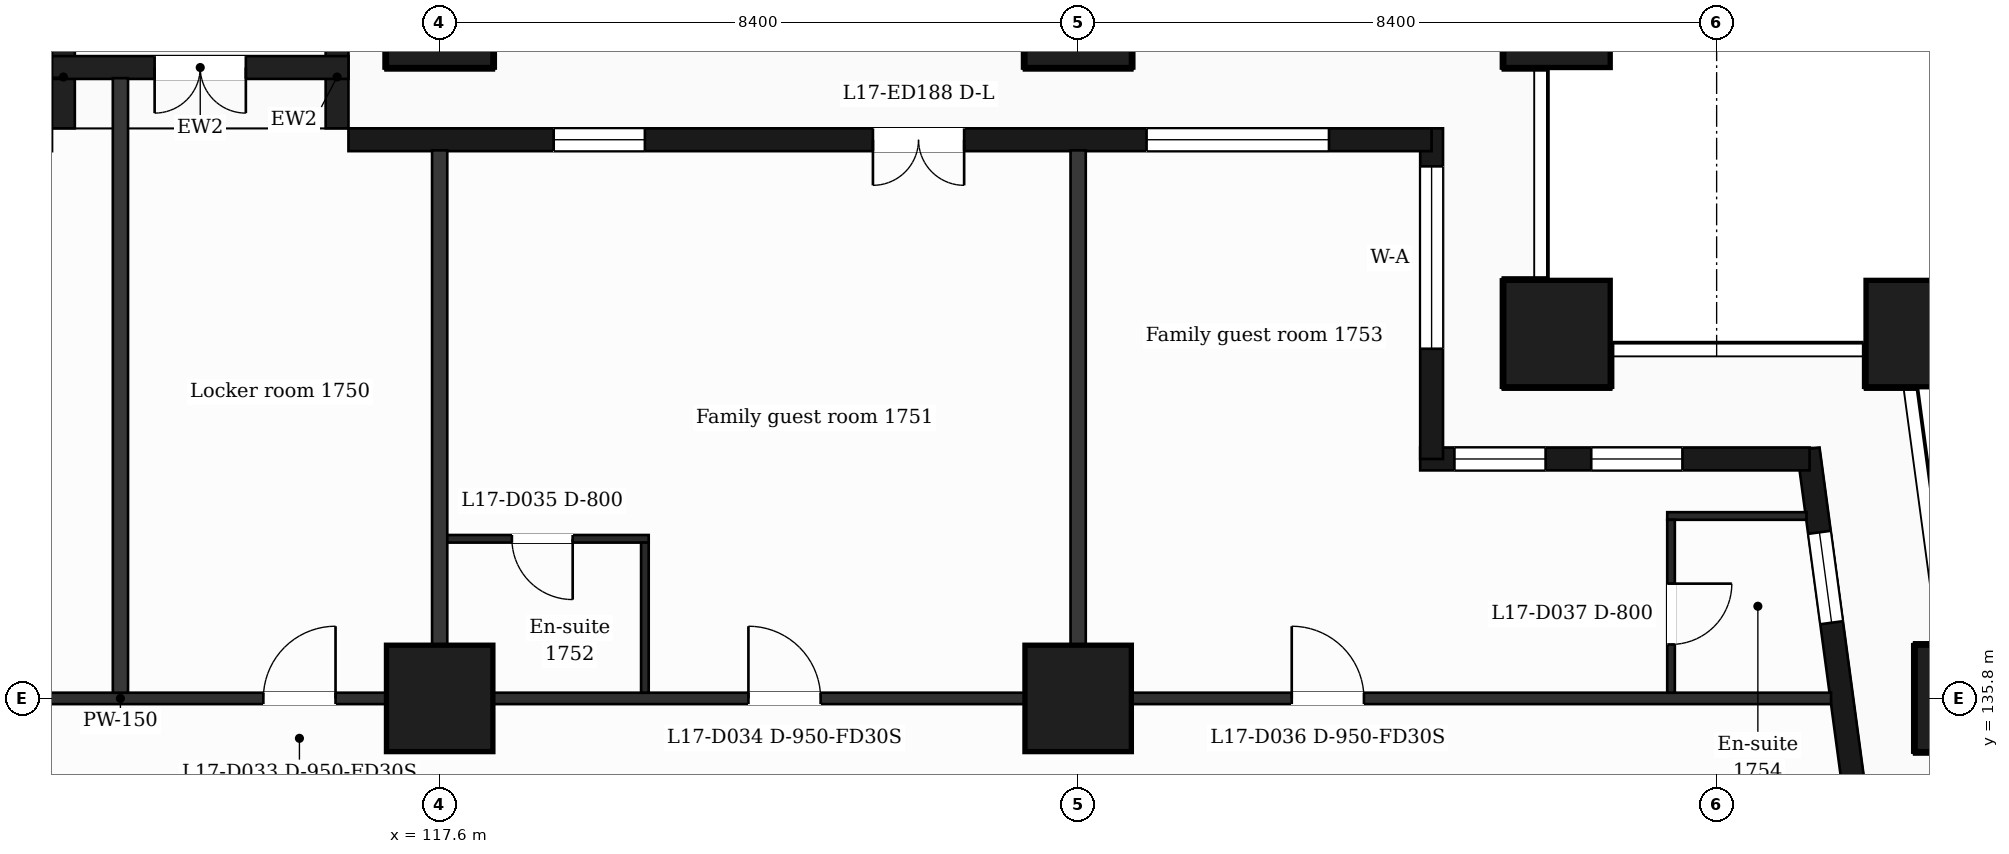
"""IFC4 building model, lengths in metres.
Left out: names, types, materials, properties, quantities, classifications, styles, units other than length and angle.
Written with IfcOpenShell. Run it as: python <this file> out.ifc"""

import sys

from ifc_helpers import new_model, si_unit, direction, frame, frame_2d, origin, origin_2d, place, context, subcontext, project, spatial, rectangle, extrude, element, fill, save


model = new_model("IFC4")
c1 = context("Model", 3, precision=1e-05, world=origin(), true_north=direction((0.0, 1.0)))
c2 = subcontext(c1, "Body", "Model", "MODEL_VIEW")
j1 = project(units=[si_unit("LENGTHUNIT", "METRE"), si_unit("PLANEANGLEUNIT", "RADIAN")], contexts=[c1])
p1 = place(None, origin())
s1 = spatial("IfcSite", under=j1, at=p1, CompositionType="ELEMENT")
p2 = place(p1, origin())
s2 = spatial("IfcBuilding", under=s1, at=p2, CompositionType="ELEMENT")
p3 = place(p2, frame((0.0, 0.0, 77.5)))
s3 = spatial("IfcBuildingStorey", under=s2, at=p3, CompositionType="ELEMENT", Elevation=77.5)
for number, where, z_axis, x_axis in (
    (1, (132.3, 140.6, 0.0), (0.0, 0.0, 1.0), (1.0, 0.0, 0.0)),
    (2, (137.065, 140.6, 0.0), (0.0, 0.0, 1.0), (1.0, 0.0, 0.0)),
    (3, (117.6, 135.8, 0.0), (0.0, 0.0, 1.0), (1.0, 0.0, 0.0)),
    (4, (126.0, 135.8, 0.0), (0.0, 0.0, 1.0), (1.0, 0.0, 0.0)),
    (5, (137.711, 135.8, 0.0), (0.0, 0.0, 1.0), (1.0, 0.0, 0.0)),
    (6, (117.6, 144.8, 0.0), (0.0, 0.0, 1.0), (1.0, 0.0, 0.0)),
    (7, (126.0, 144.8, 0.0), (0.0, 0.0, 1.0), (1.0, 0.0, 0.0)),
    (8, (132.3, 144.8, 0.0), (0.0, 0.0, 1.0), (1.0, 0.0, 0.0)),
):
    element("IfcColumn", number, at=place(p3, frame(where, z_axis=z_axis, x_axis=x_axis)), inside=s3, PredefinedType="COLUMN", context=c2, shape_type="SweptSolid", body=[
        extrude(rectangle(XDim=1.4, YDim=1.4, at=origin_2d()), origin(), (0.0, 0.0, 1.0), 3.5),
    ])
p4 = place(p3, frame((136.504, 132.4, 0.0), z_axis=(0.0, 0.0, 1.0), x_axis=(-0.133399697462, 0.99106231929, 0.0)))
e9 = element("IfcWall", 9, at=p4, inside=s3, PredefinedType="SOLIDWALL", context=c2, shape_type="SweptSolid", body=[
    extrude(rectangle(XDim=6.74, YDim=0.3, at=frame_2d((3.37, 0.0))), origin(), (0.0, 0.0, 1.0), 3.0),
])
p5 = place(p4, frame((1.115, 0.0, 0.0)))
e10 = element("IfcOpeningElement", 10, at=p5, cuts=e9, PredefinedType="OPENING", context=c2, shape_type="SweptSolid", body=[
    extrude(rectangle(XDim=1.2, YDim=2.4, at=frame_2d((0.6, 1.2))), frame((0.0, 0.16, 0.0), z_axis=(0.0, -1.0, 0.0), x_axis=(1.0, 0.0, 0.0)), (0.0, 0.0, 1.0), 0.32),
])
p6 = place(p4, frame((4.436, 0.0, 0.9)))
e11 = element("IfcOpeningElement", 11, at=p6, cuts=e9, PredefinedType="OPENING", context=c2, shape_type="SweptSolid", body=[
    extrude(rectangle(XDim=1.2, YDim=2.1, at=frame_2d((0.6, 1.05))), frame((0.0, 0.16, 0.0), z_axis=(0.0, -1.0, 0.0), x_axis=(1.0, 0.0, 0.0)), (0.0, 0.0, 1.0), 0.32),
])
p7 = place(p3, frame((135.623, 138.95, 0.0), z_axis=(0.0, 0.0, 1.0), x_axis=(-1.0, 0.0, 0.0)))
e12 = element("IfcWall", 12, at=p7, inside=s3, PredefinedType="SOLIDWALL", context=c2, shape_type="SweptSolid", body=[
    extrude(rectangle(XDim=5.123, YDim=0.3, at=frame_2d((2.561, 0.0))), origin(), (0.0, 0.0, 1.0), 3.0),
])
p8 = place(p7, frame((1.673, 0.0, 0.9)))
e13 = element("IfcOpeningElement", 13, at=p8, cuts=e12, PredefinedType="OPENING", context=c2, shape_type="SweptSolid", body=[
    extrude(rectangle(XDim=1.2, YDim=2.1, at=frame_2d((0.6, 1.05))), frame((0.0, 0.16, 0.0), z_axis=(0.0, -1.0, 0.0), x_axis=(1.0, 0.0, 0.0)), (0.0, 0.0, 1.0), 0.32),
])
p9 = place(p7, frame((3.473, 0.0, 0.9)))
e14 = element("IfcOpeningElement", 14, at=p9, cuts=e12, PredefinedType="OPENING", context=c2, shape_type="SweptSolid", body=[
    extrude(rectangle(XDim=1.2, YDim=2.1, at=frame_2d((0.6, 1.05))), frame((0.0, 0.16, 0.0), z_axis=(0.0, -1.0, 0.0), x_axis=(1.0, 0.0, 0.0)), (0.0, 0.0, 1.0), 0.32),
])
p10 = place(p3, frame((130.65, 138.95, 0.0), z_axis=(0.0, 0.0, 1.0), x_axis=(0.0, 1.0, 0.0)))
e15 = element("IfcWall", 15, at=p10, inside=s3, PredefinedType="SOLIDWALL", context=c2, shape_type="SweptSolid", body=[
    extrude(rectangle(XDim=4.35, YDim=0.3, at=frame_2d((2.175, 0.0))), origin(), (0.0, 0.0, 1.0), 3.0),
])
p11 = place(p10, frame((1.45, 0.0, 0.9)))
e16 = element("IfcOpeningElement", 16, at=p11, cuts=e15, PredefinedType="OPENING", context=c2, shape_type="SweptSolid", body=[
    extrude(rectangle(XDim=2.4, YDim=2.1, at=frame_2d((1.2, 1.05))), frame((0.0, 0.16, 0.0), z_axis=(0.0, -1.0, 0.0), x_axis=(1.0, 0.0, 0.0)), (0.0, 0.0, 1.0), 0.32),
])
p12 = place(p3, frame((130.65, 143.15, 0.0), z_axis=(0.0, 0.0, 1.0), x_axis=(-1.0, 0.0, 0.0)))
e17 = element("IfcWall", 17, at=p12, inside=s3, PredefinedType="SOLIDWALL", context=c2, shape_type="SweptSolid", body=[
    extrude(rectangle(XDim=14.25, YDim=0.3, at=frame_2d((7.125, 0.0))), origin(), (0.0, 0.0, 1.0), 3.0),
])
p13 = place(p12, frame((1.35, 0.0, 0.9)))
e18 = element("IfcOpeningElement", 18, at=p13, cuts=e17, PredefinedType="OPENING", context=c2, shape_type="SweptSolid", body=[
    extrude(rectangle(XDim=2.4, YDim=2.1, at=frame_2d((1.2, 1.05))), frame((0.0, 0.16, 0.0), z_axis=(0.0, -1.0, 0.0), x_axis=(1.0, 0.0, 0.0)), (0.0, 0.0, 1.0), 0.32),
])
p14 = place(p12, frame((6.15, 0.0, 0.0)))
e19 = element("IfcOpeningElement", 19, at=p14, cuts=e17, PredefinedType="OPENING", context=c2, shape_type="SweptSolid", body=[
    extrude(rectangle(XDim=1.2, YDim=2.4, at=frame_2d((0.6, 1.2))), frame((0.0, 0.16, 0.0), z_axis=(0.0, -1.0, 0.0), x_axis=(1.0, 0.0, 0.0)), (0.0, 0.0, 1.0), 0.32),
])
p15 = place(p12, frame((10.35, 0.0, 0.9)))
e20 = element("IfcOpeningElement", 20, at=p15, cuts=e17, PredefinedType="OPENING", context=c2, shape_type="SweptSolid", body=[
    extrude(rectangle(XDim=1.2, YDim=2.1, at=frame_2d((0.6, 1.05))), frame((0.0, 0.16, 0.0), z_axis=(0.0, -1.0, 0.0), x_axis=(1.0, 0.0, 0.0)), (0.0, 0.0, 1.0), 0.32),
])
for number, where, z_axis, x_axis in (
    (21, (116.25, 143.3, 0.0), (0.0, 0.0, 1.0), (0.0, 1.0, 0.0)),
    (22, (112.65, 143.3, 0.0), (0.0, 0.0, 1.0), (0.0, 1.0, 0.0)),
):
    element("IfcWall", number, at=place(p3, frame(where, z_axis=z_axis, x_axis=x_axis)), inside=s3, PredefinedType="SOLIDWALL", context=c2, shape_type="SweptSolid", body=[
        extrude(rectangle(XDim=1.35, YDim=0.3, at=frame_2d((0.675, 0.0))), origin(), (0.0, 0.0, 1.0), 3.0),
    ])
p16 = place(p3, frame((116.4, 144.1, 0.0), z_axis=(0.0, 0.0, 1.0), x_axis=(-1.0, 0.0, 0.0)))
e23 = element("IfcWall", 23, at=p16, inside=s3, PredefinedType="SOLIDWALL", context=c2, shape_type="SweptSolid", body=[
    extrude(rectangle(XDim=3.9, YDim=0.3, at=frame_2d((1.95, 0.0))), origin(), (0.0, 0.0, 1.0), 3.0),
])
p17 = place(p16, frame((1.35, 0.0, 0.0)))
e24 = element("IfcOpeningElement", 24, at=p17, cuts=e23, PredefinedType="OPENING", context=c2, shape_type="SweptSolid", body=[
    extrude(rectangle(XDim=1.2, YDim=2.4, at=frame_2d((0.6, 1.2))), frame((0.0, 0.16, 0.0), z_axis=(0.0, -1.0, 0.0), x_axis=(1.0, 0.0, 0.0)), (0.0, 0.0, 1.0), 0.32),
])
p18 = place(p3, frame((90.895, 135.8, 0.0), z_axis=(0.0, 0.0, 1.0), x_axis=(1.0, 0.0, 0.0)))
e25 = element("IfcWall", 25, at=p18, inside=s3, PredefinedType="PARTITIONING", context=c2, shape_type="SweptSolid", body=[
    extrude(rectangle(XDim=45.011, YDim=0.15, at=frame_2d((22.505, 0.0))), origin(), (0.0, 0.0, 1.0), 3.0),
])
p19 = place(p18, frame((7.068, 0.0, 0.0)))
e26 = element("IfcOpeningElement", 26, at=p19, cuts=e25, PredefinedType="OPENING", context=c2, shape_type="SweptSolid", body=[
    extrude(rectangle(XDim=0.95, YDim=2.1, at=frame_2d((0.475, 1.05))), frame((0.0, 0.085, 0.0), z_axis=(0.0, -1.0, 0.0), x_axis=(1.0, 0.0, 0.0)), (0.0, 0.0, 1.0), 0.17),
])
p20 = place(p18, frame((10.892, 0.0, 0.0)))
e27 = element("IfcOpeningElement", 27, at=p20, cuts=e25, PredefinedType="OPENING", context=c2, shape_type="SweptSolid", body=[
    extrude(rectangle(XDim=0.95, YDim=2.1, at=frame_2d((0.475, 1.05))), frame((0.0, 0.085, 0.0), z_axis=(0.0, -1.0, 0.0), x_axis=(1.0, 0.0, 0.0)), (0.0, 0.0, 1.0), 0.17),
])
p21 = place(p18, frame((19.465, 0.0, 0.0)))
e28 = element("IfcOpeningElement", 28, at=p21, cuts=e25, PredefinedType="OPENING", context=c2, shape_type="SweptSolid", body=[
    extrude(rectangle(XDim=0.95, YDim=2.1, at=frame_2d((0.475, 1.05))), frame((0.0, 0.085, 0.0), z_axis=(0.0, -1.0, 0.0), x_axis=(1.0, 0.0, 0.0)), (0.0, 0.0, 1.0), 0.17),
])
p22 = place(p18, frame((24.385, 0.0, 0.0)))
e29 = element("IfcOpeningElement", 29, at=p22, cuts=e25, PredefinedType="OPENING", context=c2, shape_type="SweptSolid", body=[
    extrude(rectangle(XDim=0.95, YDim=2.1, at=frame_2d((0.475, 1.05))), frame((0.0, 0.085, 0.0), z_axis=(0.0, -1.0, 0.0), x_axis=(1.0, 0.0, 0.0)), (0.0, 0.0, 1.0), 0.17),
])
p23 = place(p18, frame((30.767, 0.0, 0.0)))
e30 = element("IfcOpeningElement", 30, at=p23, cuts=e25, PredefinedType="OPENING", context=c2, shape_type="SweptSolid", body=[
    extrude(rectangle(XDim=0.95, YDim=2.1, at=frame_2d((0.475, 1.05))), frame((0.0, 0.085, 0.0), z_axis=(0.0, -1.0, 0.0), x_axis=(1.0, 0.0, 0.0)), (0.0, 0.0, 1.0), 0.17),
])
p24 = place(p18, frame((37.915, 0.0, 0.0)))
e31 = element("IfcOpeningElement", 31, at=p24, cuts=e25, PredefinedType="OPENING", context=c2, shape_type="SweptSolid", body=[
    extrude(rectangle(XDim=0.95, YDim=2.1, at=frame_2d((0.475, 1.05))), frame((0.0, 0.085, 0.0), z_axis=(0.0, -1.0, 0.0), x_axis=(1.0, 0.0, 0.0)), (0.0, 0.0, 1.0), 0.17),
])
p25 = place(p3, frame((117.6, 137.9, 0.0), z_axis=(0.0, 0.0, 1.0), x_axis=(1.0, 0.0, 0.0)))
e32 = element("IfcWall", 32, at=p25, inside=s3, PredefinedType="PARTITIONING", context=c2, shape_type="SweptSolid", body=[
    extrude(rectangle(XDim=2.75, YDim=0.1, at=frame_2d((1.375, 0.0))), origin(), (0.0, 0.0, 1.0), 3.0),
])
p26 = place(p25, frame((0.95, 0.0, 0.0)))
e33 = element("IfcOpeningElement", 33, at=p26, cuts=e32, PredefinedType="OPENING", context=c2, shape_type="SweptSolid", body=[
    extrude(rectangle(XDim=0.8, YDim=2.1, at=frame_2d((0.4, 1.05))), frame((0.0, 0.06, 0.0), z_axis=(0.0, -1.0, 0.0), x_axis=(1.0, 0.0, 0.0)), (0.0, 0.0, 1.0), 0.12),
])
p27 = place(p3, frame((133.75, 138.2, 0.0), z_axis=(0.0, 0.0, 1.0), x_axis=(1.0, 0.0, 0.0)))
e34 = element("IfcWall", 34, at=p27, inside=s3, PredefinedType="PARTITIONING", context=c2, shape_type="SweptSolid", body=[
    extrude(rectangle(XDim=1.832, YDim=0.1, at=frame_2d((0.916, 0.0))), origin(), (0.0, 0.0, 1.0), 3.0),
])
p28 = place(p3, frame((113.4, 135.875, 0.0), z_axis=(0.0, 0.0, 1.0), x_axis=(0.0, 1.0, 0.0)))
e35 = element("IfcWall", 35, at=p28, inside=s3, PredefinedType="PARTITIONING", context=c2, shape_type="SweptSolid", body=[
    extrude(rectangle(XDim=8.085, YDim=0.2, at=frame_2d((4.042, 0.0))), origin(), (0.0, 0.0, 1.0), 3.0),
])
p29 = place(p3, frame((117.6, 135.875, 0.0), z_axis=(0.0, 0.0, 1.0), x_axis=(0.0, 1.0, 0.0)))
e36 = element("IfcWall", 36, at=p29, inside=s3, PredefinedType="PARTITIONING", context=c2, shape_type="SweptSolid", body=[
    extrude(rectangle(XDim=7.135, YDim=0.2, at=frame_2d((3.567, 0.0))), origin(), (0.0, 0.0, 1.0), 3.0),
])
p30 = place(p3, frame((120.3, 135.875, 0.0), z_axis=(0.0, 0.0, 1.0), x_axis=(0.0, 1.0, 0.0)))
e37 = element("IfcWall", 37, at=p30, inside=s3, PredefinedType="PARTITIONING", context=c2, shape_type="SweptSolid", body=[
    extrude(rectangle(XDim=1.975, YDim=0.1, at=frame_2d((0.988, 0.0))), origin(), (0.0, 0.0, 1.0), 3.0),
])
p31 = place(p3, frame((126.0, 135.875, 0.0), z_axis=(0.0, 0.0, 1.0), x_axis=(0.0, 1.0, 0.0)))
e38 = element("IfcWall", 38, at=p31, inside=s3, PredefinedType="PARTITIONING", context=c2, shape_type="SweptSolid", body=[
    extrude(rectangle(XDim=7.135, YDim=0.2, at=frame_2d((3.567, 0.0))), origin(), (0.0, 0.0, 1.0), 3.0),
])
p32 = place(p3, frame((133.8, 135.875, 0.0), z_axis=(0.0, 0.0, 1.0), x_axis=(0.0, 1.0, 0.0)))
e39 = element("IfcWall", 39, at=p32, inside=s3, PredefinedType="PARTITIONING", context=c2, shape_type="SweptSolid", body=[
    extrude(rectangle(XDim=2.275, YDim=0.1, at=frame_2d((1.137, 0.0))), origin(), (0.0, 0.0, 1.0), 3.0),
])
p33 = place(p32, frame((0.635, 0.0, 0.0)))
e40 = element("IfcOpeningElement", 40, at=p33, cuts=e39, PredefinedType="OPENING", context=c2, shape_type="SweptSolid", body=[
    extrude(rectangle(XDim=0.8, YDim=2.1, at=frame_2d((0.4, 1.05))), frame((0.0, 0.06, 0.0), z_axis=(0.0, -1.0, 0.0), x_axis=(1.0, 0.0, 0.0)), (0.0, 0.0, 1.0), 0.12),
])
p34 = place(p6, origin())
e41 = element("IfcWindow", 41, at=p34, inside=s3, PartitioningType="SINGLE_PANEL", PredefinedType="WINDOW", context=c2, shape_type="SweptSolid", body=[
    extrude(rectangle(XDim=1.2, YDim=2.1, at=frame_2d((0.6, 1.05))), frame((0.0, 0.03, 0.0), z_axis=(0.0, -1.0, 0.0), x_axis=(1.0, 0.0, 0.0)), (0.0, 0.0, 1.0), 0.06),
])
fill(e11, e41)
p35 = place(p8, origin())
e42 = element("IfcWindow", 42, at=p35, inside=s3, PartitioningType="SINGLE_PANEL", PredefinedType="WINDOW", context=c2, shape_type="SweptSolid", body=[
    extrude(rectangle(XDim=1.2, YDim=2.1, at=frame_2d((0.6, 1.05))), frame((0.0, 0.03, 0.0), z_axis=(0.0, -1.0, 0.0), x_axis=(1.0, 0.0, 0.0)), (0.0, 0.0, 1.0), 0.06),
])
fill(e13, e42)
p36 = place(p9, origin())
e43 = element("IfcWindow", 43, at=p36, inside=s3, PartitioningType="SINGLE_PANEL", PredefinedType="WINDOW", context=c2, shape_type="SweptSolid", body=[
    extrude(rectangle(XDim=1.2, YDim=2.1, at=frame_2d((0.6, 1.05))), frame((0.0, 0.03, 0.0), z_axis=(0.0, -1.0, 0.0), x_axis=(1.0, 0.0, 0.0)), (0.0, 0.0, 1.0), 0.06),
])
fill(e14, e43)
p37 = place(p11, origin())
e44 = element("IfcWindow", 44, at=p37, inside=s3, PartitioningType="SINGLE_PANEL", PredefinedType="WINDOW", context=c2, shape_type="SweptSolid", body=[
    extrude(rectangle(XDim=2.4, YDim=2.1, at=frame_2d((1.2, 1.05))), frame((0.0, 0.03, 0.0), z_axis=(0.0, -1.0, 0.0), x_axis=(1.0, 0.0, 0.0)), (0.0, 0.0, 1.0), 0.06),
])
fill(e16, e44)
p38 = place(p13, origin())
e45 = element("IfcWindow", 45, at=p38, inside=s3, PartitioningType="SINGLE_PANEL", PredefinedType="WINDOW", context=c2, shape_type="SweptSolid", body=[
    extrude(rectangle(XDim=2.4, YDim=2.1, at=frame_2d((1.2, 1.05))), frame((0.0, 0.03, 0.0), z_axis=(0.0, -1.0, 0.0), x_axis=(1.0, 0.0, 0.0)), (0.0, 0.0, 1.0), 0.06),
])
fill(e18, e45)
p39 = place(p14, origin())
e46 = element("IfcDoor", 46, at=p39, inside=s3, OperationType="DOUBLE_DOOR_SINGLE_SWING", PredefinedType="DOOR", context=c2, shape_type="SweptSolid", body=[
    extrude(rectangle(XDim=1.2, YDim=2.4, at=frame_2d((0.6, 1.2))), frame((0.0, 0.025, 0.0), z_axis=(0.0, -1.0, 0.0), x_axis=(1.0, 0.0, 0.0)), (0.0, 0.0, 1.0), 0.05),
])
fill(e19, e46)
p40 = place(p15, origin())
e47 = element("IfcWindow", 47, at=p40, inside=s3, PartitioningType="SINGLE_PANEL", PredefinedType="WINDOW", context=c2, shape_type="SweptSolid", body=[
    extrude(rectangle(XDim=1.2, YDim=2.1, at=frame_2d((0.6, 1.05))), frame((0.0, 0.03, 0.0), z_axis=(0.0, -1.0, 0.0), x_axis=(1.0, 0.0, 0.0)), (0.0, 0.0, 1.0), 0.06),
])
fill(e20, e47)
p41 = place(p17, origin())
e48 = element("IfcDoor", 48, at=p41, inside=s3, OperationType="DOUBLE_DOOR_SINGLE_SWING", PredefinedType="DOOR", context=c2, shape_type="SweptSolid", body=[
    extrude(rectangle(XDim=1.2, YDim=2.4, at=frame_2d((0.6, 1.2))), frame((0.0, 0.025, 0.0), z_axis=(0.0, -1.0, 0.0), x_axis=(1.0, 0.0, 0.0)), (0.0, 0.0, 1.0), 0.05),
])
fill(e24, e48)
p42 = place(p22, origin())
e49 = element("IfcDoor", 49, at=p42, inside=s3, OperationType="SINGLE_SWING_RIGHT", PredefinedType="DOOR", context=c2, shape_type="SweptSolid", body=[
    extrude(rectangle(XDim=0.95, YDim=2.1, at=frame_2d((0.475, 1.05))), frame((0.0, 0.025, 0.0), z_axis=(0.0, -1.0, 0.0), x_axis=(1.0, 0.0, 0.0)), (0.0, 0.0, 1.0), 0.05),
])
fill(e29, e49)
p43 = place(p23, origin())
e50 = element("IfcDoor", 50, at=p43, inside=s3, OperationType="SINGLE_SWING_LEFT", PredefinedType="DOOR", context=c2, shape_type="SweptSolid", body=[
    extrude(rectangle(XDim=0.95, YDim=2.1, at=frame_2d((0.475, 1.05))), frame((0.0, 0.025, 0.0), z_axis=(0.0, -1.0, 0.0), x_axis=(1.0, 0.0, 0.0)), (0.0, 0.0, 1.0), 0.05),
])
fill(e30, e50)
p44 = place(p26, origin())
e51 = element("IfcDoor", 51, at=p44, inside=s3, OperationType="SINGLE_SWING_RIGHT", PredefinedType="DOOR", context=c2, shape_type="SweptSolid", body=[
    extrude(rectangle(XDim=0.8, YDim=2.1, at=frame_2d((0.4, 1.05))), frame((0.0, 0.025, 0.0), z_axis=(0.0, -1.0, 0.0), x_axis=(1.0, 0.0, 0.0)), (0.0, 0.0, 1.0), 0.05),
])
fill(e33, e51)
p45 = place(p24, origin())
e52 = element("IfcDoor", 52, at=p45, inside=s3, OperationType="SINGLE_SWING_LEFT", PredefinedType="DOOR", context=c2, shape_type="SweptSolid", body=[
    extrude(rectangle(XDim=0.95, YDim=2.1, at=frame_2d((0.475, 1.05))), frame((0.0, 0.025, 0.0), z_axis=(0.0, -1.0, 0.0), x_axis=(1.0, 0.0, 0.0)), (0.0, 0.0, 1.0), 0.05),
])
fill(e31, e52)
p46 = place(p33, origin())
e53 = element("IfcDoor", 53, at=p46, inside=s3, OperationType="SINGLE_SWING_RIGHT", PredefinedType="DOOR", context=c2, shape_type="SweptSolid", body=[
    extrude(rectangle(XDim=0.8, YDim=2.1, at=frame_2d((0.4, 1.05))), frame((0.0, 0.025, 0.0), z_axis=(0.0, -1.0, 0.0), x_axis=(1.0, 0.0, 0.0)), (0.0, 0.0, 1.0), 0.05),
])
fill(e40, e53)
save(model, sys.argv[1])
